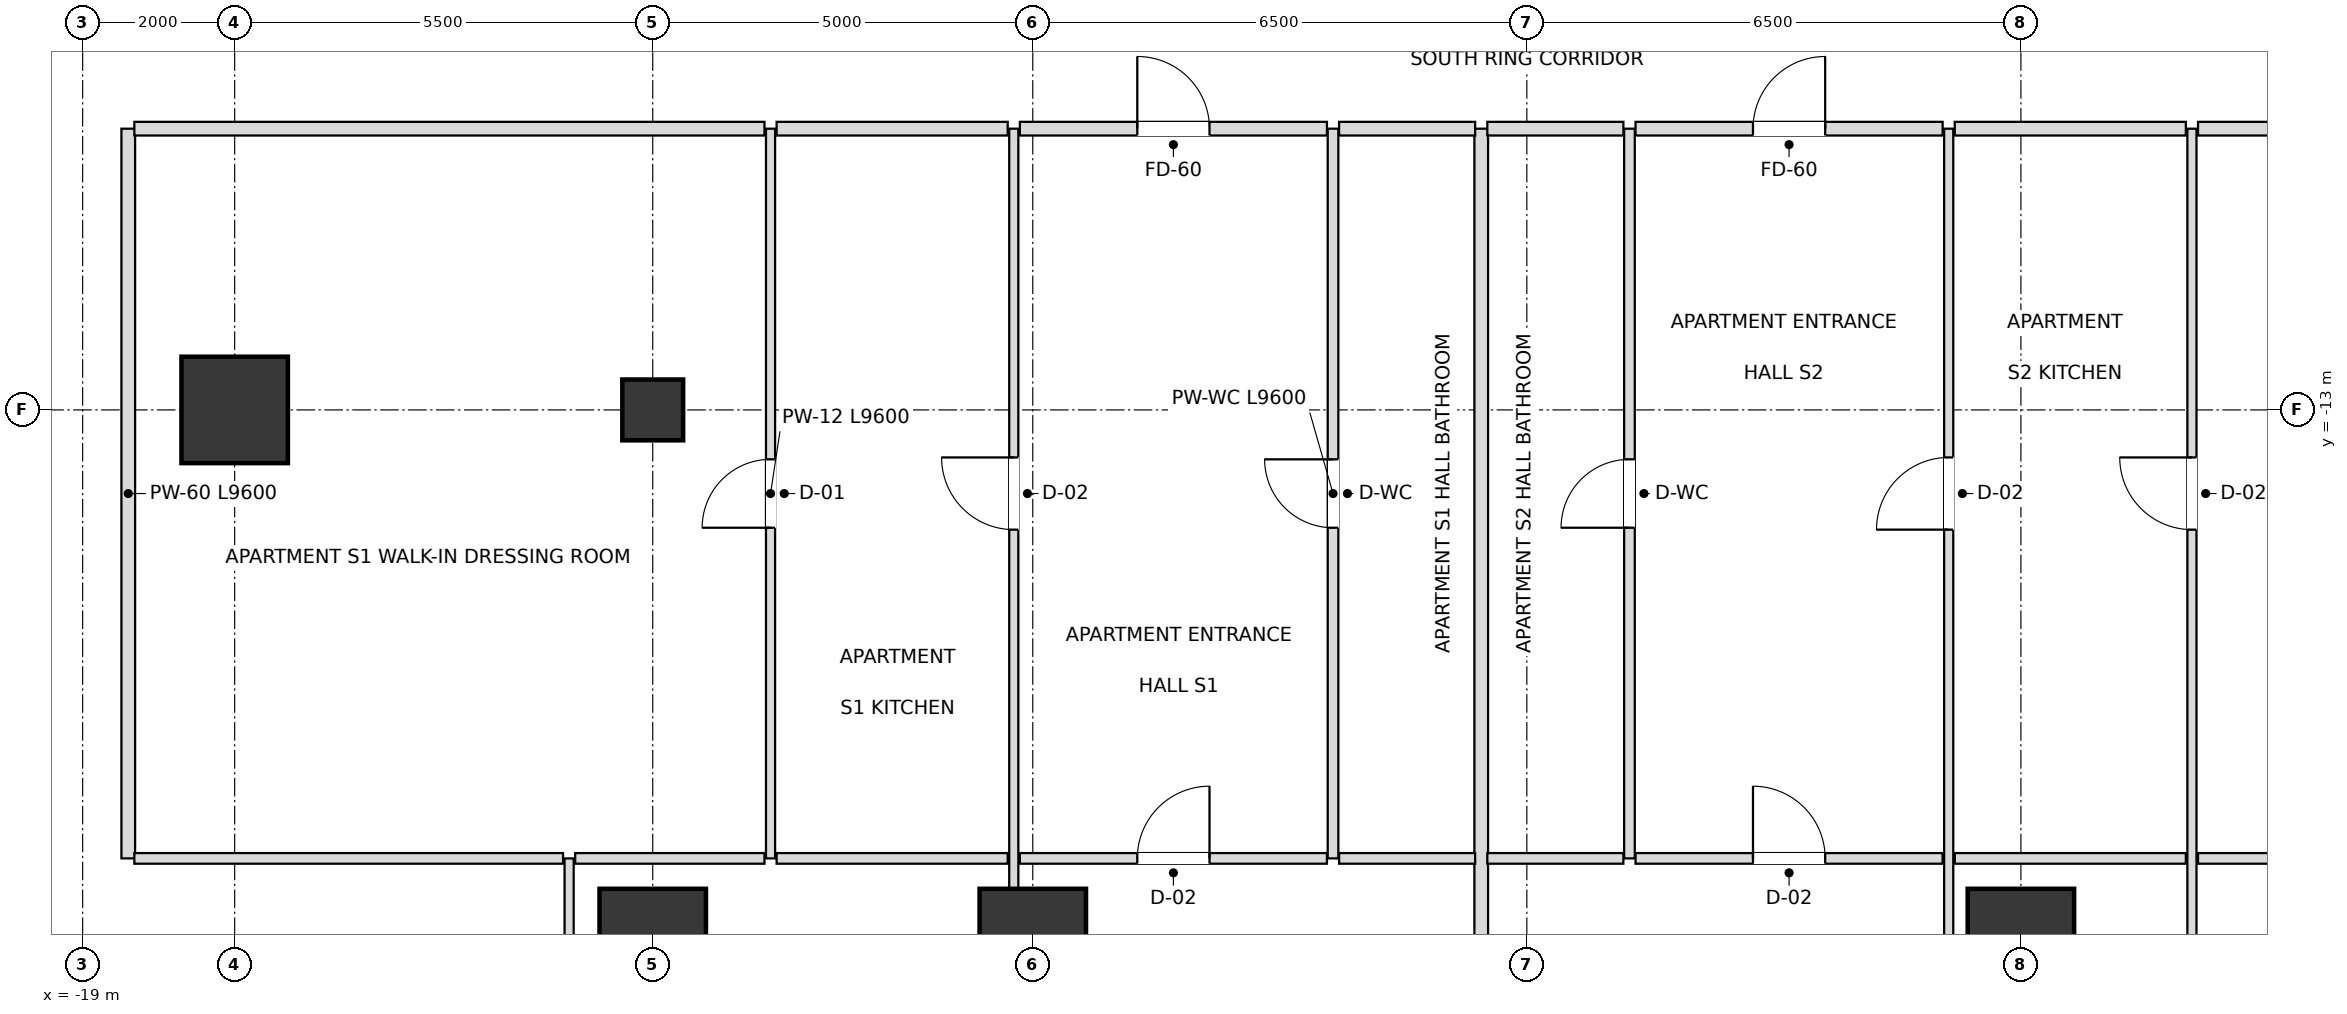
"""IFC4 building model, lengths in metres.
Left out: names, types, materials, properties, quantities, classifications, styles, units other than length and angle.
Written with IfcOpenShell. Run it as: python <this file> out.ifc"""

import sys

from ifc_helpers import new_model, si_unit, direction, frame, frame_2d, origin, origin_2d, place, context, subcontext, project, spatial, rectangle, extrude, element, fill, save


model = new_model("IFC4")
c1 = context("Model", 3, precision=1e-05, world=origin(), true_north=direction((0.0, 1.0)))
c2 = subcontext(c1, "Body", "Model", "MODEL_VIEW")
j1 = project(units=[si_unit("LENGTHUNIT", "METRE"), si_unit("PLANEANGLEUNIT", "RADIAN")], contexts=[c1])
p1 = place(None, origin())
s1 = spatial("IfcSite", under=j1, at=p1, CompositionType="ELEMENT")
p2 = place(p1, origin())
s2 = spatial("IfcBuilding", under=s1, at=p2, CompositionType="ELEMENT")
p3 = place(p2, frame((0.0, 0.0, 75.6)))
s3 = spatial("IfcBuildingStorey", under=s2, at=p3, CompositionType="ELEMENT", Elevation=75.6)
for number, where, z_axis, x_axis in (
    (1, (-11.5, -20.0, 0.0), (0.0, 0.0, 1.0), (1.0, 0.0, 0.0)),
    (2, (-6.5, -20.0, 0.0), (0.0, 0.0, 1.0), (1.0, 0.0, 0.0)),
    (3, (6.5, -20.0, 0.0), (0.0, 0.0, 1.0), (1.0, 0.0, 0.0)),
    (4, (-17.0, -13.0, 0.0), (0.0, 0.0, 1.0), (1.0, 0.0, 0.0)),
):
    element("IfcColumn", number, at=place(p3, frame(where, z_axis=z_axis, x_axis=x_axis)), inside=s3, PredefinedType="USERDEFINED", context=c2, shape_type="SweptSolid", body=[
        extrude(rectangle(XDim=1.4, YDim=1.4, at=origin_2d()), origin(), (0.0, 0.0, 1.0), 3.6),
    ])
p4 = place(p3, frame((-11.5, -13.0, 0.0), z_axis=(0.0, 0.0, 1.0), x_axis=(1.0, 0.0, 0.0)))
e5 = element("IfcColumn", 5, at=p4, inside=s3, PredefinedType="COLUMN", context=c2, shape_type="SweptSolid", body=[
    extrude(rectangle(XDim=0.8, YDim=0.8, at=origin_2d()), origin(), (0.0, 0.0, 1.0), 3.6),
])
p5 = place(p3, frame((-18.4, -18.9, 0.0), z_axis=(0.0, 0.0, 1.0), x_axis=(0.0, 1.0, 0.0)))
e6 = element("IfcWall", 6, at=p5, inside=s3, PredefinedType="PARTITIONING", context=c2, shape_type="SweptSolid", body=[
    extrude(rectangle(XDim=9.6, YDim=0.18, at=frame_2d((4.8, 0.0))), origin(), (0.0, 0.0, 1.0), 2.736),
])
p6 = place(p3, frame((-12.6, -24.9, 0.0), z_axis=(0.0, 0.0, 1.0), x_axis=(0.0, 1.0, 0.0)))
e7 = element("IfcWall", 7, at=p6, inside=s3, PredefinedType="PARTITIONING", context=c2, shape_type="SweptSolid", body=[
    extrude(rectangle(XDim=6.0, YDim=0.12, at=frame_2d((3.0, 0.0))), origin(), (0.0, 0.0, 1.0), 2.736),
])
p7 = place(p6, frame((2.55, 0.0, 0.0)))
e8 = element("IfcOpeningElement", 8, at=p7, cuts=e7, PredefinedType="OPENING", context=c2, shape_type="SweptSolid", body=[
    extrude(rectangle(XDim=0.9, YDim=2.1, at=frame_2d((0.45, 1.05))), frame((0.0, 0.07, 0.0), z_axis=(0.0, -1.0, 0.0), x_axis=(1.0, 0.0, 0.0)), (0.0, 0.0, 1.0), 0.14),
])
p8 = place(p3, frame((-9.95, -18.9, 0.0), z_axis=(0.0, 0.0, 1.0), x_axis=(0.0, 1.0, 0.0)))
e9 = element("IfcWall", 9, at=p8, inside=s3, PredefinedType="PARTITIONING", context=c2, shape_type="SweptSolid", body=[
    extrude(rectangle(XDim=9.6, YDim=0.12, at=frame_2d((4.8, 0.0))), origin(), (0.0, 0.0, 1.0), 2.816),
])
p9 = place(p8, frame((4.35, 0.0, 0.0)))
e10 = element("IfcOpeningElement", 10, at=p9, cuts=e9, PredefinedType="OPENING", context=c2, shape_type="SweptSolid", body=[
    extrude(rectangle(XDim=0.9, YDim=2.1, at=frame_2d((0.45, 1.05))), frame((0.0, 0.07, 0.0), z_axis=(0.0, -1.0, 0.0), x_axis=(1.0, 0.0, 0.0)), (0.0, 0.0, 1.0), 0.14),
])
p10 = place(p3, frame((-6.75, -24.9, 0.0), z_axis=(0.0, 0.0, 1.0), x_axis=(0.0, 1.0, 0.0)))
e11 = element("IfcWall", 11, at=p10, inside=s3, PredefinedType="PARTITIONING", context=c2, shape_type="SweptSolid", body=[
    extrude(rectangle(XDim=15.6, YDim=0.12, at=frame_2d((7.8, 0.0))), origin(), (0.0, 0.0, 1.0), 2.816),
])
p11 = place(p10, frame((10.325, 0.0, 0.0)))
e12 = element("IfcOpeningElement", 12, at=p11, cuts=e11, PredefinedType="OPENING", context=c2, shape_type="SweptSolid", body=[
    extrude(rectangle(XDim=0.95, YDim=2.1, at=frame_2d((0.475, 1.05))), frame((0.0, 0.07, 0.0), z_axis=(0.0, -1.0, 0.0), x_axis=(1.0, 0.0, 0.0)), (0.0, 0.0, 1.0), 0.14),
])
p12 = place(p10, frame((2.55, 0.0, 0.0)))
e13 = element("IfcOpeningElement", 13, at=p12, cuts=e11, PredefinedType="OPENING", context=c2, shape_type="SweptSolid", body=[
    extrude(rectangle(XDim=0.9, YDim=2.1, at=frame_2d((0.45, 1.05))), frame((0.0, 0.07, 0.0), z_axis=(0.0, -1.0, 0.0), x_axis=(1.0, 0.0, 0.0)), (0.0, 0.0, 1.0), 0.14),
])
p13 = place(p3, frame((-2.55, -18.9, 0.0), z_axis=(0.0, 0.0, 1.0), x_axis=(0.0, 1.0, 0.0)))
e14 = element("IfcWall", 14, at=p13, inside=s3, PredefinedType="PARTITIONING", context=c2, shape_type="SweptSolid", body=[
    extrude(rectangle(XDim=9.6, YDim=0.14, at=frame_2d((4.8, 0.0))), origin(), (0.0, 0.0, 1.0), 2.948),
])
p14 = place(p13, frame((4.35, 0.0, 0.0)))
e15 = element("IfcOpeningElement", 15, at=p14, cuts=e14, PredefinedType="OPENING", context=c2, shape_type="SweptSolid", body=[
    extrude(rectangle(XDim=0.9, YDim=2.1, at=frame_2d((0.45, 1.05))), frame((0.0, 0.08, 0.0), z_axis=(0.0, -1.0, 0.0), x_axis=(1.0, 0.0, 0.0)), (0.0, 0.0, 1.0), 0.16),
])
p15 = place(p3, frame((-0.6, -24.9, 0.0), z_axis=(0.0, 0.0, 1.0), x_axis=(0.0, 1.0, 0.0)))
e16 = element("IfcWall", 16, at=p15, inside=s3, PredefinedType="PARTITIONING", context=c2, shape_type="SweptSolid", body=[
    extrude(rectangle(XDim=15.6, YDim=0.18, at=frame_2d((7.8, 0.0))), origin(), (0.0, 0.0, 1.0), 2.816),
])
p16 = place(p3, frame((1.35, -18.9, 0.0), z_axis=(0.0, 0.0, 1.0), x_axis=(0.0, 1.0, 0.0)))
e17 = element("IfcWall", 17, at=p16, inside=s3, PredefinedType="PARTITIONING", context=c2, shape_type="SweptSolid", body=[
    extrude(rectangle(XDim=9.6, YDim=0.14, at=frame_2d((4.8, 0.0))), origin(), (0.0, 0.0, 1.0), 2.948),
])
p17 = place(p16, frame((4.35, 0.0, 0.0)))
e18 = element("IfcOpeningElement", 18, at=p17, cuts=e17, PredefinedType="OPENING", context=c2, shape_type="SweptSolid", body=[
    extrude(rectangle(XDim=0.9, YDim=2.1, at=frame_2d((0.45, 1.05))), frame((0.0, 0.08, 0.0), z_axis=(0.0, -1.0, 0.0), x_axis=(1.0, 0.0, 0.0)), (0.0, 0.0, 1.0), 0.16),
])
p18 = place(p3, frame((5.55, -24.9, 0.0), z_axis=(0.0, 0.0, 1.0), x_axis=(0.0, 1.0, 0.0)))
e19 = element("IfcWall", 19, at=p18, inside=s3, PredefinedType="PARTITIONING", context=c2, shape_type="SweptSolid", body=[
    extrude(rectangle(XDim=15.6, YDim=0.12, at=frame_2d((7.8, 0.0))), origin(), (0.0, 0.0, 1.0), 2.816),
])
p19 = place(p18, frame((10.325, 0.0, 0.0)))
e20 = element("IfcOpeningElement", 20, at=p19, cuts=e19, PredefinedType="OPENING", context=c2, shape_type="SweptSolid", body=[
    extrude(rectangle(XDim=0.95, YDim=2.1, at=frame_2d((0.475, 1.05))), frame((0.0, 0.07, 0.0), z_axis=(0.0, -1.0, 0.0), x_axis=(1.0, 0.0, 0.0)), (0.0, 0.0, 1.0), 0.14),
])
p20 = place(p18, frame((2.55, 0.0, 0.0)))
e21 = element("IfcOpeningElement", 21, at=p20, cuts=e19, PredefinedType="OPENING", context=c2, shape_type="SweptSolid", body=[
    extrude(rectangle(XDim=0.9, YDim=2.1, at=frame_2d((0.45, 1.05))), frame((0.0, 0.07, 0.0), z_axis=(0.0, -1.0, 0.0), x_axis=(1.0, 0.0, 0.0)), (0.0, 0.0, 1.0), 0.14),
])
p21 = place(p3, frame((8.75, -24.9, 0.0), z_axis=(0.0, 0.0, 1.0), x_axis=(0.0, 1.0, 0.0)))
e22 = element("IfcWall", 22, at=p21, inside=s3, PredefinedType="PARTITIONING", context=c2, shape_type="SweptSolid", body=[
    extrude(rectangle(XDim=15.6, YDim=0.12, at=frame_2d((7.8, 0.0))), origin(), (0.0, 0.0, 1.0), 2.816),
])
p22 = place(p21, frame((10.325, 0.0, 0.0)))
e23 = element("IfcOpeningElement", 23, at=p22, cuts=e22, PredefinedType="OPENING", context=c2, shape_type="SweptSolid", body=[
    extrude(rectangle(XDim=0.95, YDim=2.1, at=frame_2d((0.475, 1.05))), frame((0.0, 0.07, 0.0), z_axis=(0.0, -1.0, 0.0), x_axis=(1.0, 0.0, 0.0)), (0.0, 0.0, 1.0), 0.14),
])
p23 = place(p21, frame((2.55, 0.0, 0.0)))
e24 = element("IfcOpeningElement", 24, at=p23, cuts=e22, PredefinedType="OPENING", context=c2, shape_type="SweptSolid", body=[
    extrude(rectangle(XDim=0.9, YDim=2.1, at=frame_2d((0.45, 1.05))), frame((0.0, 0.07, 0.0), z_axis=(0.0, -1.0, 0.0), x_axis=(1.0, 0.0, 0.0)), (0.0, 0.0, 1.0), 0.14),
])
p24 = place(p3, frame((-18.32, -18.9, 0.0), z_axis=(0.0, 0.0, 1.0), x_axis=(1.0, 0.0, 0.0)))
e25 = element("IfcWall", 25, at=p24, inside=s3, PredefinedType="PARTITIONING", context=c2, shape_type="SweptSolid", body=[
    extrude(rectangle(XDim=5.64, YDim=0.14, at=frame_2d((2.82, 0.0))), origin(), (0.0, 0.0, 1.0), 2.736),
])
p25 = place(p3, frame((-12.52, -18.9, 0.0), z_axis=(0.0, 0.0, 1.0), x_axis=(1.0, 0.0, 0.0)))
e26 = element("IfcWall", 26, at=p25, inside=s3, PredefinedType="PARTITIONING", context=c2, shape_type="SweptSolid", body=[
    extrude(rectangle(XDim=2.49, YDim=0.14, at=frame_2d((1.245, 0.0))), origin(), (0.0, 0.0, 1.0), 2.736),
])
p26 = place(p3, frame((-9.87, -18.9, 0.0), z_axis=(0.0, 0.0, 1.0), x_axis=(1.0, 0.0, 0.0)))
e27 = element("IfcWall", 27, at=p26, inside=s3, PredefinedType="PARTITIONING", context=c2, shape_type="SweptSolid", body=[
    extrude(rectangle(XDim=3.04, YDim=0.14, at=frame_2d((1.52, 0.0))), origin(), (0.0, 0.0, 1.0), 3.38),
])
p27 = place(p3, frame((-6.67, -18.9, 0.0), z_axis=(0.0, 0.0, 1.0), x_axis=(1.0, 0.0, 0.0)))
e28 = element("IfcWall", 28, at=p27, inside=s3, PredefinedType="PARTITIONING", context=c2, shape_type="SweptSolid", body=[
    extrude(rectangle(XDim=4.04, YDim=0.14, at=frame_2d((2.02, 0.0))), origin(), (0.0, 0.0, 1.0), 2.816),
])
p28 = place(p27, frame((1.545, 0.0, 0.0)))
e29 = element("IfcOpeningElement", 29, at=p28, cuts=e28, PredefinedType="OPENING", context=c2, shape_type="SweptSolid", body=[
    extrude(rectangle(XDim=0.95, YDim=2.1, at=frame_2d((0.475, 1.05))), frame((0.0, 0.08, 0.0), z_axis=(0.0, -1.0, 0.0), x_axis=(1.0, 0.0, 0.0)), (0.0, 0.0, 1.0), 0.16),
])
for number, where, z_axis, x_axis in (
    (30, (-2.47, -18.9, 0.0), (0.0, 0.0, 1.0), (1.0, 0.0, 0.0)),
    (31, (-0.52, -18.9, 0.0), (0.0, 0.0, 1.0), (1.0, 0.0, 0.0)),
):
    element("IfcWall", number, at=place(p3, frame(where, z_axis=z_axis, x_axis=x_axis)), inside=s3, PredefinedType="PARTITIONING", context=c2, shape_type="SweptSolid", body=[
        extrude(rectangle(XDim=1.79, YDim=0.14, at=frame_2d((0.895, 0.0))), origin(), (0.0, 0.0, 1.0), 3.38),
    ])
p29 = place(p3, frame((1.43, -18.9, 0.0), z_axis=(0.0, 0.0, 1.0), x_axis=(1.0, 0.0, 0.0)))
e32 = element("IfcWall", 32, at=p29, inside=s3, PredefinedType="PARTITIONING", context=c2, shape_type="SweptSolid", body=[
    extrude(rectangle(XDim=4.04, YDim=0.14, at=frame_2d((2.02, 0.0))), origin(), (0.0, 0.0, 1.0), 3.38),
])
p30 = place(p29, frame((1.545, 0.0, 0.0)))
e33 = element("IfcOpeningElement", 33, at=p30, cuts=e32, PredefinedType="OPENING", context=c2, shape_type="SweptSolid", body=[
    extrude(rectangle(XDim=0.95, YDim=2.1, at=frame_2d((0.475, 1.05))), frame((0.0, 0.08, 0.0), z_axis=(0.0, -1.0, 0.0), x_axis=(1.0, 0.0, 0.0)), (0.0, 0.0, 1.0), 0.16),
])
p31 = place(p3, frame((5.63, -18.9, 0.0), z_axis=(0.0, 0.0, 1.0), x_axis=(1.0, 0.0, 0.0)))
e34 = element("IfcWall", 34, at=p31, inside=s3, PredefinedType="PARTITIONING", context=c2, shape_type="SweptSolid", body=[
    extrude(rectangle(XDim=3.04, YDim=0.14, at=frame_2d((1.52, 0.0))), origin(), (0.0, 0.0, 1.0), 2.816),
])
p32 = place(p3, frame((8.83, -18.9, 0.0), z_axis=(0.0, 0.0, 1.0), x_axis=(1.0, 0.0, 0.0)))
e35 = element("IfcWall", 35, at=p32, inside=s3, PredefinedType="PARTITIONING", context=c2, shape_type="SweptSolid", body=[
    extrude(rectangle(XDim=4.14, YDim=0.14, at=frame_2d((2.07, 0.0))), origin(), (0.0, 0.0, 1.0), 2.736),
])
p33 = place(p3, frame((-18.32, -9.3, 0.0), z_axis=(0.0, 0.0, 1.0), x_axis=(1.0, 0.0, 0.0)))
e36 = element("IfcWall", 36, at=p33, inside=s3, PredefinedType="PARTITIONING", context=c2, shape_type="SweptSolid", body=[
    extrude(rectangle(XDim=8.29, YDim=0.18, at=frame_2d((4.145, 0.0))), origin(), (0.0, 0.0, 1.0), 2.816),
])
p34 = place(p3, frame((-9.87, -9.3, 0.0), z_axis=(0.0, 0.0, 1.0), x_axis=(1.0, 0.0, 0.0)))
e37 = element("IfcWall", 37, at=p34, inside=s3, PredefinedType="PARTITIONING", context=c2, shape_type="SweptSolid", body=[
    extrude(rectangle(XDim=3.04, YDim=0.18, at=frame_2d((1.52, 0.0))), origin(), (0.0, 0.0, 1.0), 3.38),
])
p35 = place(p3, frame((-6.67, -9.3, 0.0), z_axis=(0.0, 0.0, 1.0), x_axis=(1.0, 0.0, 0.0)))
e38 = element("IfcWall", 38, at=p35, inside=s3, PredefinedType="PARTITIONING", context=c2, shape_type="SweptSolid", body=[
    extrude(rectangle(XDim=4.04, YDim=0.18, at=frame_2d((2.02, 0.0))), origin(), (0.0, 0.0, 1.0), 2.816),
])
p36 = place(p35, frame((1.545, 0.0, 0.0)))
e39 = element("IfcOpeningElement", 39, at=p36, cuts=e38, PredefinedType="OPENING", context=c2, shape_type="SweptSolid", body=[
    extrude(rectangle(XDim=0.95, YDim=2.15, at=frame_2d((0.475, 1.075))), frame((0.0, 0.1, 0.0), z_axis=(0.0, -1.0, 0.0), x_axis=(1.0, 0.0, 0.0)), (0.0, 0.0, 1.0), 0.2),
])
for number, where, z_axis, x_axis in (
    (40, (-2.47, -9.3, 0.0), (0.0, 0.0, 1.0), (1.0, 0.0, 0.0)),
    (41, (-0.52, -9.3, 0.0), (0.0, 0.0, 1.0), (1.0, 0.0, 0.0)),
):
    element("IfcWall", number, at=place(p3, frame(where, z_axis=z_axis, x_axis=x_axis)), inside=s3, PredefinedType="PARTITIONING", context=c2, shape_type="SweptSolid", body=[
        extrude(rectangle(XDim=1.79, YDim=0.18, at=frame_2d((0.895, 0.0))), origin(), (0.0, 0.0, 1.0), 3.38),
    ])
p37 = place(p3, frame((1.43, -9.3, 0.0), z_axis=(0.0, 0.0, 1.0), x_axis=(1.0, 0.0, 0.0)))
e42 = element("IfcWall", 42, at=p37, inside=s3, PredefinedType="PARTITIONING", context=c2, shape_type="SweptSolid", body=[
    extrude(rectangle(XDim=4.04, YDim=0.18, at=frame_2d((2.02, 0.0))), origin(), (0.0, 0.0, 1.0), 3.38),
])
p38 = place(p37, frame((1.545, 0.0, 0.0)))
e43 = element("IfcOpeningElement", 43, at=p38, cuts=e42, PredefinedType="OPENING", context=c2, shape_type="SweptSolid", body=[
    extrude(rectangle(XDim=0.95, YDim=2.15, at=frame_2d((0.475, 1.075))), frame((0.0, 0.1, 0.0), z_axis=(0.0, -1.0, 0.0), x_axis=(1.0, 0.0, 0.0)), (0.0, 0.0, 1.0), 0.2),
])
p39 = place(p3, frame((5.63, -9.3, 0.0), z_axis=(0.0, 0.0, 1.0), x_axis=(1.0, 0.0, 0.0)))
e44 = element("IfcWall", 44, at=p39, inside=s3, PredefinedType="PARTITIONING", context=c2, shape_type="SweptSolid", body=[
    extrude(rectangle(XDim=3.04, YDim=0.18, at=frame_2d((1.52, 0.0))), origin(), (0.0, 0.0, 1.0), 2.816),
])
p40 = place(p3, frame((8.83, -9.3, 0.0), z_axis=(0.0, 0.0, 1.0), x_axis=(1.0, 0.0, 0.0)))
e45 = element("IfcWall", 45, at=p40, inside=s3, PredefinedType="PARTITIONING", context=c2, shape_type="SweptSolid", body=[
    extrude(rectangle(XDim=9.49, YDim=0.18, at=frame_2d((4.745, 0.0))), origin(), (0.0, 0.0, 1.0), 2.816),
])
p41 = place(p14, origin())
e46 = element("IfcDoor", 46, at=p41, inside=s3, OperationType="SINGLE_SWING_RIGHT", PredefinedType="DOOR", context=c2, shape_type="SweptSolid", body=[
    extrude(rectangle(XDim=0.9, YDim=2.1, at=frame_2d((0.45, 1.05))), frame((0.0, 0.025, 0.0), z_axis=(0.0, -1.0, 0.0), x_axis=(1.0, 0.0, 0.0)), (0.0, 0.0, 1.0), 0.05),
])
fill(e15, e46)
p42 = place(p36, origin())
e47 = element("IfcDoor", 47, at=p42, inside=s3, OperationType="SINGLE_SWING_LEFT", PredefinedType="DOOR", context=c2, shape_type="SweptSolid", body=[
    extrude(rectangle(XDim=0.95, YDim=2.15, at=frame_2d((0.475, 1.075))), frame((0.0, 0.025, 0.0), z_axis=(0.0, -1.0, 0.0), x_axis=(1.0, 0.0, 0.0)), (0.0, 0.0, 1.0), 0.05),
])
fill(e39, e47)
p43 = place(p11, origin())
e48 = element("IfcDoor", 48, at=p43, inside=s3, OperationType="SINGLE_SWING_RIGHT", PredefinedType="DOOR", context=c2, shape_type="SweptSolid", body=[
    extrude(rectangle(XDim=0.95, YDim=2.1, at=frame_2d((0.475, 1.05))), frame((0.0, 0.025, 0.0), z_axis=(0.0, -1.0, 0.0), x_axis=(1.0, 0.0, 0.0)), (0.0, 0.0, 1.0), 0.05),
])
fill(e12, e48)
p44 = place(p9, origin())
e49 = element("IfcDoor", 49, at=p44, inside=s3, OperationType="SINGLE_SWING_LEFT", PredefinedType="DOOR", context=c2, shape_type="SweptSolid", body=[
    extrude(rectangle(XDim=0.9, YDim=2.1, at=frame_2d((0.45, 1.05))), frame((0.0, 0.025, 0.0), z_axis=(0.0, -1.0, 0.0), x_axis=(1.0, 0.0, 0.0)), (0.0, 0.0, 1.0), 0.05),
])
fill(e10, e49)
p45 = place(p28, origin())
e50 = element("IfcDoor", 50, at=p45, inside=s3, OperationType="SINGLE_SWING_RIGHT", PredefinedType="DOOR", context=c2, shape_type="SweptSolid", body=[
    extrude(rectangle(XDim=0.95, YDim=2.1, at=frame_2d((0.475, 1.05))), frame((0.0, 0.025, 0.0), z_axis=(0.0, -1.0, 0.0), x_axis=(1.0, 0.0, 0.0)), (0.0, 0.0, 1.0), 0.05),
])
fill(e29, e50)
p46 = place(p17, origin())
e51 = element("IfcDoor", 51, at=p46, inside=s3, OperationType="SINGLE_SWING_LEFT", PredefinedType="DOOR", context=c2, shape_type="SweptSolid", body=[
    extrude(rectangle(XDim=0.9, YDim=2.1, at=frame_2d((0.45, 1.05))), frame((0.0, 0.025, 0.0), z_axis=(0.0, -1.0, 0.0), x_axis=(1.0, 0.0, 0.0)), (0.0, 0.0, 1.0), 0.05),
])
fill(e18, e51)
p47 = place(p38, origin())
e52 = element("IfcDoor", 52, at=p47, inside=s3, OperationType="SINGLE_SWING_RIGHT", PredefinedType="DOOR", context=c2, shape_type="SweptSolid", body=[
    extrude(rectangle(XDim=0.95, YDim=2.15, at=frame_2d((0.475, 1.075))), frame((0.0, 0.025, 0.0), z_axis=(0.0, -1.0, 0.0), x_axis=(1.0, 0.0, 0.0)), (0.0, 0.0, 1.0), 0.05),
])
fill(e43, e52)
p48 = place(p19, origin())
e53 = element("IfcDoor", 53, at=p48, inside=s3, OperationType="SINGLE_SWING_LEFT", PredefinedType="DOOR", context=c2, shape_type="SweptSolid", body=[
    extrude(rectangle(XDim=0.95, YDim=2.1, at=frame_2d((0.475, 1.05))), frame((0.0, 0.025, 0.0), z_axis=(0.0, -1.0, 0.0), x_axis=(1.0, 0.0, 0.0)), (0.0, 0.0, 1.0), 0.05),
])
fill(e20, e53)
p49 = place(p22, origin())
e54 = element("IfcDoor", 54, at=p49, inside=s3, OperationType="SINGLE_SWING_RIGHT", PredefinedType="DOOR", context=c2, shape_type="SweptSolid", body=[
    extrude(rectangle(XDim=0.95, YDim=2.1, at=frame_2d((0.475, 1.05))), frame((0.0, 0.025, 0.0), z_axis=(0.0, -1.0, 0.0), x_axis=(1.0, 0.0, 0.0)), (0.0, 0.0, 1.0), 0.05),
])
fill(e23, e54)
p50 = place(p30, origin())
e55 = element("IfcDoor", 55, at=p50, inside=s3, OperationType="SINGLE_SWING_LEFT", PredefinedType="DOOR", context=c2, shape_type="SweptSolid", body=[
    extrude(rectangle(XDim=0.95, YDim=2.1, at=frame_2d((0.475, 1.05))), frame((0.0, 0.025, 0.0), z_axis=(0.0, -1.0, 0.0), x_axis=(1.0, 0.0, 0.0)), (0.0, 0.0, 1.0), 0.05),
])
fill(e33, e55)
save(model, sys.argv[1])
